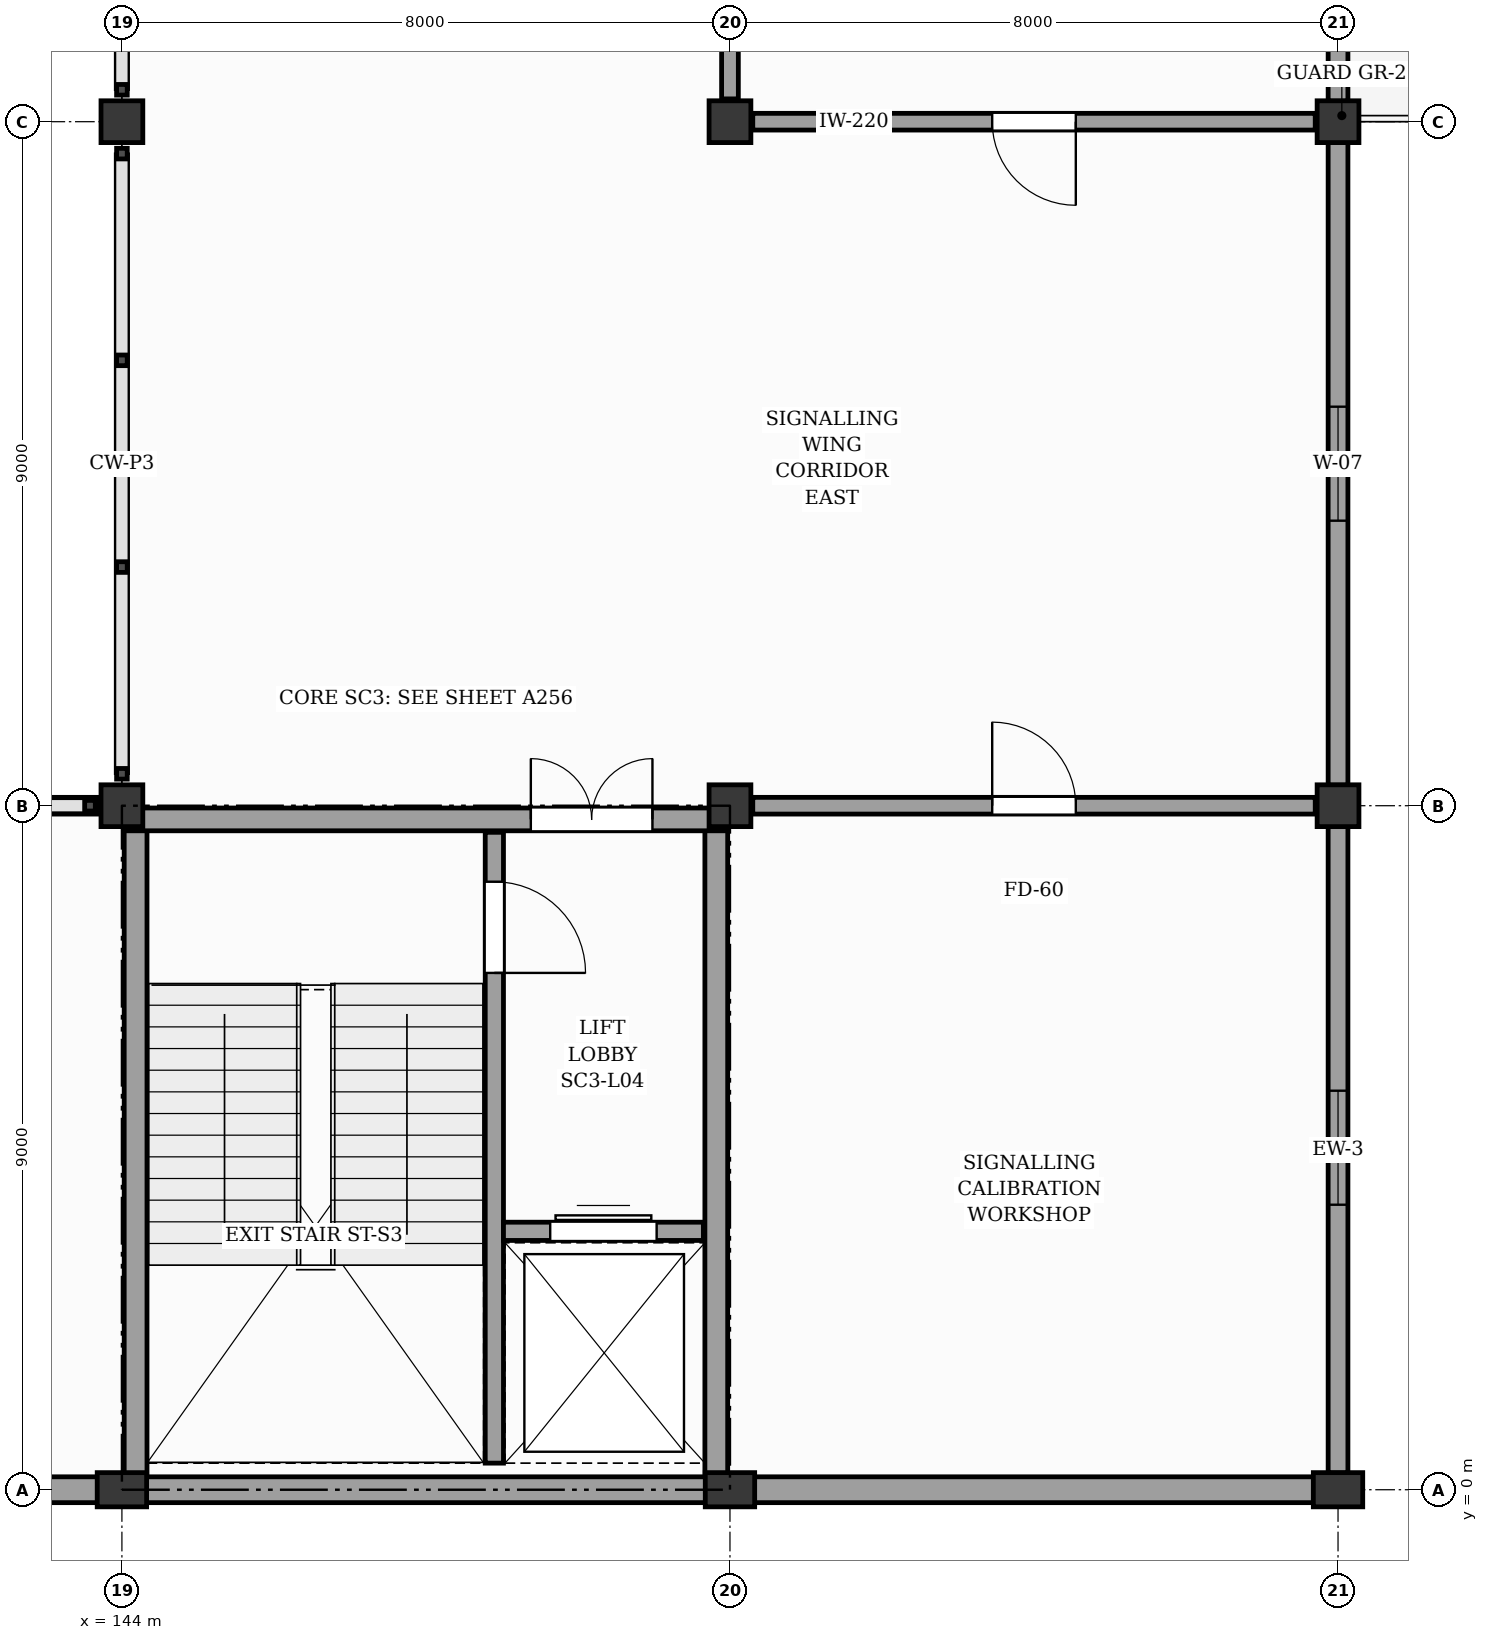
"""IFC4 building model, lengths in metres.
Left out: names, types, materials, properties, quantities, classifications, styles, units other than length and angle.
Written with IfcOpenShell. Run it as: python <this file> out.ifc"""

import sys

from ifc_helpers import new_model, si_unit, direction, frame, frame_2d, origin, origin_2d, place, context, subcontext, project, spatial, rectangle, extrude, element, fill, save


model = new_model("IFC4")
c1 = context("Model", 3, precision=1e-05, world=origin(), true_north=direction((0.0, 1.0)))
c2 = subcontext(c1, "Body", "Model", "MODEL_VIEW")
j1 = project(units=[si_unit("LENGTHUNIT", "METRE"), si_unit("PLANEANGLEUNIT", "RADIAN")], contexts=[c1])
p1 = place(None, origin())
s1 = spatial("IfcSite", under=j1, at=p1, CompositionType="ELEMENT")
p2 = place(p1, origin())
s2 = spatial("IfcBuilding", under=s1, at=p2, CompositionType="ELEMENT")
p3 = place(p2, frame((0.0, 0.0, 20.4)))
s3 = spatial("IfcBuildingStorey", under=s2, at=p3, CompositionType="ELEMENT", Elevation=20.4)
p4 = place(p3, frame((144.0, 0.0, 0.0), z_axis=(0.0, 0.0, 1.0), x_axis=(1.0, 0.0, 0.0)))
e1 = element("IfcColumn", 1, at=p4, inside=s3, PredefinedType="PILASTER", context=c2, shape_type="SweptSolid", body=[
    extrude(rectangle(XDim=0.65, YDim=0.45, at=origin_2d()), origin(), (0.0, 0.0, 1.0), 4.2),
])
for number, where, z_axis, x_axis in (
    (2, (144.0, 9.0, 0.0), (0.0, 0.0, 1.0), (1.0, 0.0, 0.0)),
    (3, (144.0, 18.0, 0.0), (0.0, 0.0, 1.0), (1.0, 0.0, 0.0)),
):
    element("IfcColumn", number, at=place(p3, frame(where, z_axis=z_axis, x_axis=x_axis)), inside=s3, PredefinedType="COLUMN", context=c2, shape_type="SweptSolid", body=[
        extrude(rectangle(XDim=0.55, YDim=0.55, at=origin_2d()), origin(), (0.0, 0.0, 1.0), 4.2),
    ])
p5 = place(p3, frame((152.0, 0.0, 0.0), z_axis=(0.0, 0.0, 1.0), x_axis=(1.0, 0.0, 0.0)))
e4 = element("IfcColumn", 4, at=p5, inside=s3, PredefinedType="PILASTER", context=c2, shape_type="SweptSolid", body=[
    extrude(rectangle(XDim=0.65, YDim=0.45, at=origin_2d()), origin(), (0.0, 0.0, 1.0), 4.2),
])
for number, where, z_axis, x_axis in (
    (5, (152.0, 9.0, 0.0), (0.0, 0.0, 1.0), (1.0, 0.0, 0.0)),
    (6, (152.0, 18.0, 0.0), (0.0, 0.0, 1.0), (1.0, 0.0, 0.0)),
):
    element("IfcColumn", number, at=place(p3, frame(where, z_axis=z_axis, x_axis=x_axis)), inside=s3, PredefinedType="COLUMN", context=c2, shape_type="SweptSolid", body=[
        extrude(rectangle(XDim=0.55, YDim=0.55, at=origin_2d()), origin(), (0.0, 0.0, 1.0), 4.2),
    ])
p6 = place(p3, frame((160.0, 0.0, 0.0), z_axis=(0.0, 0.0, 1.0), x_axis=(1.0, 0.0, 0.0)))
e7 = element("IfcColumn", 7, at=p6, inside=s3, PredefinedType="PILASTER", context=c2, shape_type="SweptSolid", body=[
    extrude(rectangle(XDim=0.65, YDim=0.45, at=origin_2d()), origin(), (0.0, 0.0, 1.0), 4.2),
])
for number, where, z_axis, x_axis in (
    (8, (160.0, 9.0, 0.0), (0.0, 0.0, 1.0), (1.0, 0.0, 0.0)),
    (9, (160.0, 18.0, 0.0), (0.0, 0.0, 1.0), (1.0, 0.0, 0.0)),
):
    element("IfcColumn", number, at=place(p3, frame(where, z_axis=z_axis, x_axis=x_axis)), inside=s3, PredefinedType="COLUMN", context=c2, shape_type="SweptSolid", body=[
        extrude(rectangle(XDim=0.55, YDim=0.55, at=origin_2d()), origin(), (0.0, 0.0, 1.0), 4.2),
    ])
p7 = place(p3, frame((136.32, 0.0, 0.0), z_axis=(0.0, 0.0, 1.0), x_axis=(1.0, 0.0, 0.0)))
e10 = element("IfcWall", 10, at=p7, inside=s3, PredefinedType="SOLIDWALL", context=c2, shape_type="SweptSolid", body=[
    extrude(rectangle(XDim=7.36, YDim=0.34, at=frame_2d((3.68, 0.0))), origin(), (0.0, 0.0, 1.0), 3.18),
])
for number, where, z_axis, x_axis in (
    (11, (144.32, 0.0, 0.0), (0.0, 0.0, 1.0), (1.0, 0.0, 0.0)),
    (12, (152.32, 0.0, 0.0), (0.0, 0.0, 1.0), (1.0, 0.0, 0.0)),
):
    element("IfcWall", number, at=place(p3, frame(where, z_axis=z_axis, x_axis=x_axis)), inside=s3, PredefinedType="SOLIDWALL", context=c2, shape_type="SweptSolid", body=[
        extrude(rectangle(XDim=7.36, YDim=0.34, at=frame_2d((3.68, 0.0))), origin(), (0.0, 0.0, 1.0), 3.24),
    ])
p8 = place(p3, frame((160.0, 0.22, 0.0), z_axis=(0.0, 0.0, 1.0), x_axis=(0.0, 1.0, 0.0)))
e13 = element("IfcWall", 13, at=p8, inside=s3, PredefinedType="SOLIDWALL", context=c2, shape_type="SweptSolid", body=[
    extrude(rectangle(XDim=8.51, YDim=0.26, at=frame_2d((4.255, 0.0))), origin(), (0.0, 0.0, 1.0), 3.18),
])
p9 = place(p8, frame((3.53, 0.0, 0.95)))
e14 = element("IfcOpeningElement", 14, at=p9, cuts=e13, PredefinedType="OPENING", context=c2, shape_type="SweptSolid", body=[
    extrude(rectangle(XDim=1.5, YDim=1.9, at=frame_2d((0.75, 0.95))), frame((0.0, 0.14, 0.0), z_axis=(0.0, -1.0, 0.0), x_axis=(1.0, 0.0, 0.0)), (0.0, 0.0, 1.0), 0.28),
])
p10 = place(p3, frame((160.0, 9.27, 0.0), z_axis=(0.0, 0.0, 1.0), x_axis=(0.0, 1.0, 0.0)))
e15 = element("IfcWall", 15, at=p10, inside=s3, PredefinedType="SOLIDWALL", context=c2, shape_type="SweptSolid", body=[
    extrude(rectangle(XDim=8.46, YDim=0.26, at=frame_2d((4.23, 0.0))), origin(), (0.0, 0.0, 1.0), 3.18),
])
p11 = place(p10, frame((3.48, 0.0, 0.95)))
e16 = element("IfcOpeningElement", 16, at=p11, cuts=e15, PredefinedType="OPENING", context=c2, shape_type="SweptSolid", body=[
    extrude(rectangle(XDim=1.5, YDim=1.9, at=frame_2d((0.75, 0.95))), frame((0.0, 0.14, 0.0), z_axis=(0.0, -1.0, 0.0), x_axis=(1.0, 0.0, 0.0)), (0.0, 0.0, 1.0), 0.28),
])
p12 = place(p3, frame((160.0, 18.27, 0.0), z_axis=(0.0, 0.0, 1.0), x_axis=(0.0, 1.0, 0.0)))
e17 = element("IfcWall", 17, at=p12, inside=s3, PredefinedType="SOLIDWALL", context=c2, shape_type="SweptSolid", body=[
    extrude(rectangle(XDim=8.46, YDim=0.26, at=frame_2d((4.23, 0.0))), origin(), (0.0, 0.0, 1.0), 3.18),
])
p13 = place(p12, frame((3.33, 0.0, 0.0)))
e18 = element("IfcOpeningElement", 18, at=p13, cuts=e17, PredefinedType="OPENING", context=c2, shape_type="SweptSolid", body=[
    extrude(rectangle(XDim=1.8, YDim=2.2, at=frame_2d((0.9, 1.1))), frame((0.0, 0.14, 0.0), z_axis=(0.0, -1.0, 0.0), x_axis=(1.0, 0.0, 0.0)), (0.0, 0.0, 1.0), 0.28),
])
p14 = place(p3, frame((148.9, 0.35, 0.0), z_axis=(0.0, 0.0, 1.0), x_axis=(0.0, 1.0, 0.0)))
e19 = element("IfcWall", 19, at=p14, inside=s3, PredefinedType="SHEAR", context=c2, shape_type="SweptSolid", body=[
    extrude(rectangle(XDim=8.3, YDim=0.24, at=frame_2d((4.15, 0.0))), origin(), (0.0, 0.0, 1.0), 3.92),
])
p15 = place(p14, frame((6.45, 0.0, 0.0)))
e20 = element("IfcOpeningElement", 20, at=p15, cuts=e19, PredefinedType="OPENING", context=c2, shape_type="SweptSolid", body=[
    extrude(rectangle(XDim=1.2, YDim=2.15, at=frame_2d((0.6, 1.075))), frame((0.0, 0.13, 0.0), z_axis=(0.0, -1.0, 0.0), x_axis=(1.0, 0.0, 0.0)), (0.0, 0.0, 1.0), 0.26),
])
p16 = place(p3, frame((149.02, 3.4, 0.0), z_axis=(0.0, 0.0, 1.0), x_axis=(1.0, 0.0, 0.0)))
e21 = element("IfcWall", 21, at=p16, inside=s3, PredefinedType="SHEAR", context=c2, shape_type="SweptSolid", body=[
    extrude(rectangle(XDim=2.63, YDim=0.24, at=frame_2d((1.315, 0.0))), origin(), (0.0, 0.0, 1.0), 3.92),
])
p17 = place(p16, frame((0.615, 0.0, 0.0)))
e22 = element("IfcOpeningElement", 22, at=p17, cuts=e21, PredefinedType="OPENING", context=c2, shape_type="SweptSolid", body=[
    extrude(rectangle(XDim=1.4, YDim=2.15, at=frame_2d((0.7, 1.075))), frame((0.0, 0.13, 0.0), z_axis=(0.0, -1.0, 0.0), x_axis=(1.0, 0.0, 0.0)), (0.0, 0.0, 1.0), 0.26),
])
for number, where, z_axis, x_axis in (
    (23, (144.18, 0.18, 0.0), (0.0, 0.0, 1.0), (0.0, 1.0, 0.0)),
    (24, (151.82, 0.18, 0.0), (0.0, 0.0, 1.0), (0.0, 1.0, 0.0)),
):
    element("IfcWall", number, at=place(p3, frame(where, z_axis=z_axis, x_axis=x_axis)), inside=s3, PredefinedType="SHEAR", context=c2, shape_type="SweptSolid", body=[
        extrude(rectangle(XDim=8.64, YDim=0.3, at=frame_2d((4.32, 0.0))), origin(), (0.0, 0.0, 1.0), 3.92),
    ])
p18 = place(p3, frame((144.03, 8.82, 0.0), z_axis=(0.0, 0.0, 1.0), x_axis=(1.0, 0.0, 0.0)))
e25 = element("IfcWall", 25, at=p18, inside=s3, PredefinedType="SHEAR", context=c2, shape_type="SweptSolid", body=[
    extrude(rectangle(XDim=7.94, YDim=0.3, at=frame_2d((3.97, 0.0))), origin(), (0.0, 0.0, 1.0), 3.92),
])
p19 = place(p18, frame((5.35, 0.0, 0.0)))
e26 = element("IfcOpeningElement", 26, at=p19, cuts=e25, PredefinedType="OPENING", context=c2, shape_type="SweptSolid", body=[
    extrude(rectangle(XDim=1.6, YDim=2.15, at=frame_2d((0.8, 1.075))), frame((0.0, 0.16, 0.0), z_axis=(0.0, -1.0, 0.0), x_axis=(1.0, 0.0, 0.0)), (0.0, 0.0, 1.0), 0.32),
])
p20 = place(p3, frame((136.3, 9.0, 0.0), z_axis=(0.0, 0.0, 1.0), x_axis=(1.0, 0.0, 0.0)))
e27 = element("IfcWall", 27, at=p20, inside=s3, PredefinedType="SOLIDWALL", context=c2, shape_type="SweptSolid", body=[
    extrude(rectangle(XDim=7.4, YDim=0.22, at=frame_2d((3.7, 0.0))), origin(), (0.0, 0.0, 1.0), 3.1),
])
p21 = place(p3, frame((152.3, 18.0, 0.0), z_axis=(0.0, 0.0, 1.0), x_axis=(1.0, 0.0, 0.0)))
e28 = element("IfcWall", 28, at=p21, inside=s3, PredefinedType="SOLIDWALL", context=c2, shape_type="SweptSolid", body=[
    extrude(rectangle(XDim=7.4, YDim=0.22, at=frame_2d((3.7, 0.0))), origin(), (0.0, 0.0, 1.0), 3.1),
])
p22 = place(p21, frame((3.15, 0.0, 0.0)))
e29 = element("IfcOpeningElement", 29, at=p22, cuts=e28, PredefinedType="OPENING", context=c2, shape_type="SweptSolid", body=[
    extrude(rectangle(XDim=1.1, YDim=2.15, at=frame_2d((0.55, 1.075))), frame((0.0, 0.12, 0.0), z_axis=(0.0, -1.0, 0.0), x_axis=(1.0, 0.0, 0.0)), (0.0, 0.0, 1.0), 0.24),
])
p23 = place(p3, frame((152.0, 18.3, 0.0), z_axis=(0.0, 0.0, 1.0), x_axis=(0.0, 1.0, 0.0)))
e30 = element("IfcWall", 30, at=p23, inside=s3, PredefinedType="SOLIDWALL", context=c2, shape_type="SweptSolid", body=[
    extrude(rectangle(XDim=8.4, YDim=0.22, at=frame_2d((4.2, 0.0))), origin(), (0.0, 0.0, 1.0), 3.1),
])
p24 = place(p3, frame((152.3, 9.0, 0.0), z_axis=(0.0, 0.0, 1.0), x_axis=(1.0, 0.0, 0.0)))
e31 = element("IfcWall", 31, at=p24, inside=s3, PredefinedType="SOLIDWALL", context=c2, shape_type="SweptSolid", body=[
    extrude(rectangle(XDim=7.4, YDim=0.22, at=frame_2d((3.7, 0.0))), origin(), (0.0, 0.0, 1.0), 3.1),
])
p25 = place(p24, frame((3.15, 0.0, 0.0)))
e32 = element("IfcOpeningElement", 32, at=p25, cuts=e31, PredefinedType="OPENING", context=c2, shape_type="SweptSolid", body=[
    extrude(rectangle(XDim=1.1, YDim=2.15, at=frame_2d((0.55, 1.075))), frame((0.0, 0.12, 0.0), z_axis=(0.0, -1.0, 0.0), x_axis=(1.0, 0.0, 0.0)), (0.0, 0.0, 1.0), 0.24),
])
p26 = place(p9, origin())
e33 = element("IfcWindow", 33, at=p26, inside=s3, PartitioningType="SINGLE_PANEL", PredefinedType="WINDOW", context=c2, shape_type="SweptSolid", body=[
    extrude(rectangle(XDim=1.5, YDim=1.9, at=frame_2d((0.75, 0.95))), frame((0.0, 0.03, 0.0), z_axis=(0.0, -1.0, 0.0), x_axis=(1.0, 0.0, 0.0)), (0.0, 0.0, 1.0), 0.06),
])
fill(e14, e33)
p27 = place(p11, origin())
e34 = element("IfcWindow", 34, at=p27, inside=s3, PartitioningType="SINGLE_PANEL", PredefinedType="WINDOW", context=c2, shape_type="SweptSolid", body=[
    extrude(rectangle(XDim=1.5, YDim=1.9, at=frame_2d((0.75, 0.95))), frame((0.0, 0.03, 0.0), z_axis=(0.0, -1.0, 0.0), x_axis=(1.0, 0.0, 0.0)), (0.0, 0.0, 1.0), 0.06),
])
fill(e16, e34)
p28 = place(p15, frame((1.2, 0.0, 0.0), z_axis=(0.0, 0.0, 1.0), x_axis=(-1.0, 0.0, 0.0)))
e35 = element("IfcDoor", 35, at=p28, inside=s3, OperationType="SINGLE_SWING_LEFT", PredefinedType="DOOR", context=c2, shape_type="SweptSolid", body=[
    extrude(rectangle(XDim=1.2, YDim=2.15, at=frame_2d((0.6, 1.075))), frame((0.0, 0.025, 0.0), z_axis=(0.0, -1.0, 0.0), x_axis=(1.0, 0.0, 0.0)), (0.0, 0.0, 1.0), 0.05),
])
fill(e20, e35)
p29 = place(p17, origin())
e36 = element("IfcDoor", 36, at=p29, inside=s3, OperationType="DOUBLE_DOOR_SLIDING", PredefinedType="DOOR", context=c2, shape_type="SweptSolid", body=[
    extrude(rectangle(XDim=1.4, YDim=2.15, at=frame_2d((0.7, 1.075))), frame((0.0, 0.025, 0.0), z_axis=(0.0, -1.0, 0.0), x_axis=(1.0, 0.0, 0.0)), (0.0, 0.0, 1.0), 0.05),
])
fill(e22, e36)
p30 = place(p19, origin())
e37 = element("IfcDoor", 37, at=p30, inside=s3, OperationType="DOUBLE_DOOR_SINGLE_SWING", PredefinedType="DOOR", context=c2, shape_type="SweptSolid", body=[
    extrude(rectangle(XDim=1.6, YDim=2.15, at=frame_2d((0.8, 1.075))), frame((0.0, 0.025, 0.0), z_axis=(0.0, -1.0, 0.0), x_axis=(1.0, 0.0, 0.0)), (0.0, 0.0, 1.0), 0.05),
])
fill(e26, e37)
p31 = place(p22, frame((1.1, 0.0, 0.0), z_axis=(0.0, 0.0, 1.0), x_axis=(-1.0, 0.0, 0.0)))
e38 = element("IfcDoor", 38, at=p31, inside=s3, OperationType="SINGLE_SWING_RIGHT", PredefinedType="DOOR", context=c2, shape_type="SweptSolid", body=[
    extrude(rectangle(XDim=1.1, YDim=2.15, at=frame_2d((0.55, 1.075))), frame((0.0, 0.025, 0.0), z_axis=(0.0, -1.0, 0.0), x_axis=(1.0, 0.0, 0.0)), (0.0, 0.0, 1.0), 0.05),
])
fill(e29, e38)
p32 = place(p25, origin())
e39 = element("IfcDoor", 39, at=p32, inside=s3, OperationType="SINGLE_SWING_LEFT", PredefinedType="DOOR", context=c2, shape_type="SweptSolid", body=[
    extrude(rectangle(XDim=1.1, YDim=2.15, at=frame_2d((0.55, 1.075))), frame((0.0, 0.025, 0.0), z_axis=(0.0, -1.0, 0.0), x_axis=(1.0, 0.0, 0.0)), (0.0, 0.0, 1.0), 0.05),
])
fill(e32, e39)
save(model, sys.argv[1])
